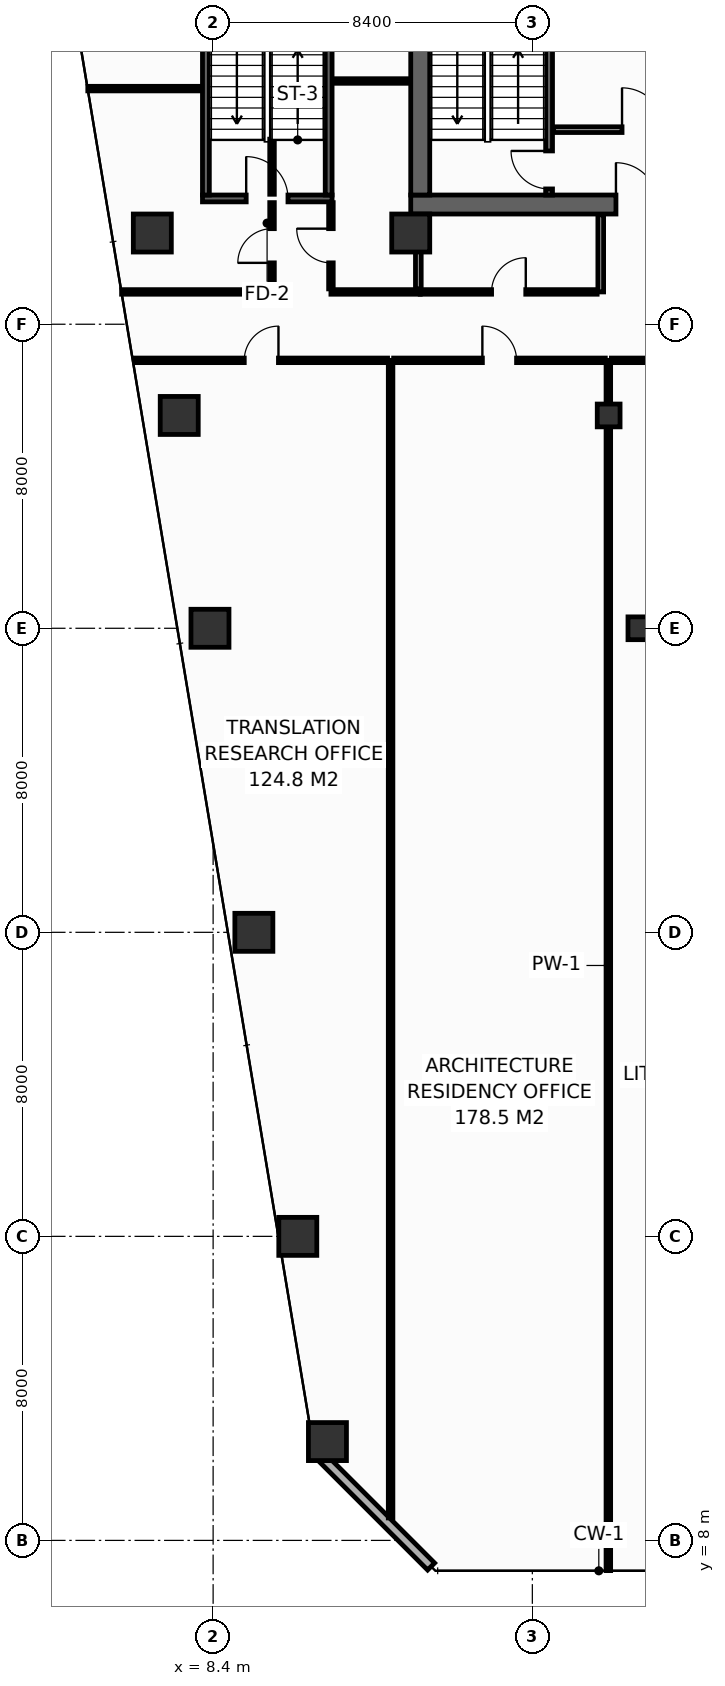
"""IFC4 building model, lengths in metres.
Left out: names, types, materials, properties, quantities, classifications, styles, units other than length and angle.
Written with IfcOpenShell. Run it as: python <this file> out.ifc"""

import sys

from ifc_helpers import new_model, si_unit, direction, frame, frame_2d, origin, origin_2d, place, context, subcontext, project, spatial, rectangle, hollow_rectangle, extrude, element, fill, save


model = new_model("IFC4")
c1 = context("Model", 3, precision=1e-05, world=origin(), true_north=direction((0.0, 1.0)))
c2 = subcontext(c1, "Body", "Model", "MODEL_VIEW")
j1 = project(units=[si_unit("LENGTHUNIT", "METRE"), si_unit("PLANEANGLEUNIT", "RADIAN")], contexts=[c1])
p1 = place(None, origin())
s1 = spatial("IfcSite", under=j1, at=p1, CompositionType="ELEMENT")
p2 = place(p1, origin())
s2 = spatial("IfcBuilding", under=s1, at=p2, CompositionType="ELEMENT")
p3 = place(p2, frame((0.0, 0.0, 160.0)))
s3 = spatial("IfcBuildingStorey", under=s2, at=p3, CompositionType="ELEMENT", Elevation=160.0)
p4 = place(p3, frame((13.6, 43.15, 0.0), z_axis=(0.0, 0.0, 1.0), x_axis=(1.0, 0.0, 0.0)))
e1 = element("IfcWall", 1, at=p4, inside=s3, PredefinedType="SHEAR", context=c2, shape_type="SweptSolid", body=[
    extrude(rectangle(XDim=32.7, YDim=0.5, at=frame_2d((16.35, 0.0))), origin(), (0.0, 0.0, 1.0), 3.55),
])
p5 = place(p4, frame((5.4, 0.0, 0.0)))
e2 = element("IfcOpeningElement", 2, at=p5, cuts=e1, PredefinedType="OPENING", context=c2, shape_type="SweptSolid", body=[
    extrude(rectangle(XDim=1.1, YDim=2.15, at=frame_2d((0.55, 1.075))), frame((0.0, 0.26, 0.0), z_axis=(0.0, -1.0, 0.0), x_axis=(1.0, 0.0, 0.0)), (0.0, 0.0, 1.0), 0.52),
])
p6 = place(p4, frame((25.6, 0.0, 0.0)))
e3 = element("IfcOpeningElement", 3, at=p6, cuts=e1, PredefinedType="OPENING", context=c2, shape_type="SweptSolid", body=[
    extrude(rectangle(XDim=1.1, YDim=2.15, at=frame_2d((0.55, 1.075))), frame((0.0, 0.26, 0.0), z_axis=(0.0, -1.0, 0.0), x_axis=(1.0, 0.0, 0.0)), (0.0, 0.0, 1.0), 0.52),
])
p7 = place(p3, frame((13.85, 43.4, 0.0), z_axis=(0.0, 0.0, 1.0), x_axis=(0.0, 1.0, 0.0)))
e4 = element("IfcWall", 4, at=p7, inside=s3, PredefinedType="SHEAR", context=c2, shape_type="SweptSolid", body=[
    extrude(rectangle(XDim=10.4, YDim=0.5, at=frame_2d((5.2, 0.0))), origin(), (0.0, 0.0, 1.0), 3.55),
])
for number, where, z_axis, x_axis in (
    (5, (6.8, 42.4, 0.0), (0.0, 0.0, 1.0), (1.0, 0.0, 0.0)),
    (6, (13.6, 42.4, 0.0), (0.0, 0.0, 1.0), (1.0, 0.0, 0.0)),
    (7, (11.408, 10.6, 0.0), (0.0, 0.0, 1.0), (1.0, 0.0, 0.0)),
    (8, (10.628, 16.0, 0.0), (0.0, 0.0, 1.0), (1.0, 0.0, 0.0)),
    (9, (9.472, 24.0, 0.0), (0.0, 0.0, 1.0), (1.0, 0.0, 0.0)),
    (10, (8.317, 32.0, 0.0), (0.0, 0.0, 1.0), (1.0, 0.0, 0.0)),
):
    element("IfcColumn", number, at=place(p3, frame(where, z_axis=z_axis, x_axis=x_axis)), inside=s3, PredefinedType="COLUMN", context=c2, shape_type="SweptSolid", body=[
        extrude(hollow_rectangle(XDim=1.0, YDim=1.0, WallThickness=0.045, at=origin_2d()), origin(), (0.0, 0.0, 1.0), 3.8),
    ])
p8 = place(p3, frame((19.617, 32.0, 0.0), z_axis=(0.0, 0.0, 1.0), x_axis=(1.0, 0.0, 0.0)))
e11 = element("IfcColumn", 11, at=p8, inside=s3, PredefinedType="COLUMN", context=c2, shape_type="SweptSolid", body=[
    extrude(hollow_rectangle(XDim=0.6, YDim=0.6, WallThickness=0.028, at=origin_2d()), origin(), (0.0, 0.0, 1.0), 3.8),
])
p9 = place(p3, frame((7.508, 37.6, 0.0), z_axis=(0.0, 0.0, 1.0), x_axis=(1.0, 0.0, 0.0)))
e12 = element("IfcColumn", 12, at=p9, inside=s3, PredefinedType="COLUMN", context=c2, shape_type="SweptSolid", body=[
    extrude(hollow_rectangle(XDim=1.0, YDim=1.0, WallThickness=0.045, at=origin_2d()), origin(), (0.0, 0.0, 1.0), 3.8),
])
p10 = place(p3, frame((18.808, 37.6, 0.0), z_axis=(0.0, 0.0, 1.0), x_axis=(1.0, 0.0, 0.0)))
e13 = element("IfcColumn", 13, at=p10, inside=s3, PredefinedType="COLUMN", context=c2, shape_type="SweptSolid", body=[
    extrude(hollow_rectangle(XDim=0.6, YDim=0.6, WallThickness=0.028, at=origin_2d()), origin(), (0.0, 0.0, 1.0), 3.8),
])
p11 = place(p3, frame((17.24, 43.4, 0.0), z_axis=(0.0, 0.0, 1.0), x_axis=(0.0, 1.0, 0.0)))
e14 = element("IfcWall", 14, at=p11, inside=s3, PredefinedType="SHEAR", context=c2, shape_type="SweptSolid", body=[
    extrude(rectangle(XDim=10.4, YDim=0.18, at=frame_2d((5.2, 0.0))), origin(), (0.0, 0.0, 1.0), 3.55),
])
p12 = place(p11, frame((0.16, 0.0, 0.0)))
e15 = element("IfcOpeningElement", 15, at=p12, cuts=e14, PredefinedType="OPENING", context=c2, shape_type="SweptSolid", body=[
    extrude(rectangle(XDim=1.0, YDim=2.15, at=frame_2d((0.5, 1.075))), frame((0.0, 0.1, 0.0), z_axis=(0.0, -1.0, 0.0), x_axis=(1.0, 0.0, 0.0)), (0.0, 0.0, 1.0), 0.2),
])
p13 = place(p3, frame((8.12, 43.31, 0.0), z_axis=(0.0, 0.0, 1.0), x_axis=(1.0, 0.0, 0.0)))
e16 = element("IfcWall", 16, at=p13, inside=s3, PredefinedType="SHEAR", context=c2, shape_type="SweptSolid", body=[
    extrude(rectangle(XDim=3.41, YDim=0.18, at=frame_2d((1.705, 0.0))), origin(), (0.0, 0.0, 1.0), 3.55),
])
p14 = place(p13, frame((1.15, 0.0, 0.0)))
e17 = element("IfcOpeningElement", 17, at=p14, cuts=e16, PredefinedType="OPENING", context=c2, shape_type="SweptSolid", body=[
    extrude(rectangle(XDim=1.1, YDim=2.15, at=frame_2d((0.55, 1.075))), frame((0.0, 0.1, 0.0), z_axis=(0.0, -1.0, 0.0), x_axis=(1.0, 0.0, 0.0)), (0.0, 0.0, 1.0), 0.2),
])
for number, where, z_axis, x_axis in (
    (18, (11.44, 43.4, 0.0), (0.0, 0.0, 1.0), (0.0, 1.0, 0.0)),
    (19, (8.21, 53.8, 0.0), (0.0, 0.0, 1.0), (0.0, -1.0, 0.0)),
):
    element("IfcWall", number, at=place(p3, frame(where, z_axis=z_axis, x_axis=x_axis)), inside=s3, PredefinedType="SHEAR", context=c2, shape_type="SweptSolid", body=[
        extrude(rectangle(XDim=10.4, YDim=0.18, at=frame_2d((5.2, 0.0))), origin(), (0.0, 0.0, 1.0), 3.55),
    ])
p15 = place(p3, frame((17.36, 45.12, 0.0), z_axis=(0.0, 0.0, 1.0), x_axis=(1.0, 0.0, 0.0)))
e20 = element("IfcWall", 20, at=p15, inside=s3, PredefinedType="PARTITIONING", context=c2, shape_type="SweptSolid", body=[
    extrude(rectangle(XDim=5.14, YDim=0.15, at=frame_2d((2.57, 0.0))), origin(), (0.0, 0.0, 1.0), 3.55),
])
p16 = place(p15, frame((1.8, 0.0, 0.0)))
e21 = element("IfcOpeningElement", 21, at=p16, cuts=e20, PredefinedType="OPENING", context=c2, shape_type="SweptSolid", body=[
    extrude(rectangle(XDim=1.1, YDim=2.15, at=frame_2d((0.55, 1.075))), frame((0.0, 0.085, 0.0), z_axis=(0.0, -1.0, 0.0), x_axis=(1.0, 0.0, 0.0)), (0.0, 0.0, 1.0), 0.17),
])
p17 = place(p3, frame((11.162, 10.287, 0.0), z_axis=(0.0, 0.0, 1.0), x_axis=(0.70707775441, -0.707135806771, 0.0)))
e22 = element("IfcWall", 22, at=p17, inside=s3, PredefinedType="STANDARD", context=c2, shape_type="SweptSolid", body=[
    extrude(rectangle(XDim=4.206, YDim=0.26, at=frame_2d((2.103, 0.0))), origin(), (0.0, 0.0, 1.0), 3.55),
])
p18 = place(p3, frame((5.992, 40.85, 0.0), z_axis=(0.0, 0.0, 1.0), x_axis=(1.0, 0.0, 0.0)))
e23 = element("IfcWall", 23, at=p18, inside=s3, PredefinedType="PARTITIONING", context=c2, shape_type="SweptSolid", body=[
    extrude(rectangle(XDim=3.958, YDim=0.12, at=frame_2d((1.979, 0.0))), origin(), (0.0, 0.0, 1.0), 3.035),
])
p19 = place(p3, frame((11.5, 40.85, 0.0), z_axis=(0.0, 0.0, 1.0), x_axis=(1.0, 0.0, 0.0)))
e24 = element("IfcWall", 24, at=p19, inside=s3, PredefinedType="PARTITIONING", context=c2, shape_type="SweptSolid", body=[
    extrude(rectangle(XDim=2.35, YDim=0.12, at=frame_2d((1.175, 0.0))), origin(), (0.0, 0.0, 1.0), 3.55),
])
p20 = place(p3, frame((5.102, 46.2, 0.0), z_axis=(0.0, 0.0, 1.0), x_axis=(1.0, 0.0, 0.0)))
e25 = element("IfcWall", 25, at=p20, inside=s3, PredefinedType="PARTITIONING", context=c2, shape_type="SweptSolid", body=[
    extrude(rectangle(XDim=2.998, YDim=0.12, at=frame_2d((1.499, 0.0))), origin(), (0.0, 0.0, 1.0), 2.835),
])
p21 = place(p3, frame((9.95, 40.93, 0.0), z_axis=(0.0, 0.0, 1.0), x_axis=(0.0, 1.0, 0.0)))
e26 = element("IfcWall", 26, at=p21, inside=s3, PredefinedType="PARTITIONING", context=c2, shape_type="SweptSolid", body=[
    extrude(rectangle(XDim=2.27, YDim=0.12, at=frame_2d((1.135, 0.0))), origin(), (0.0, 0.0, 1.0), 2.835),
])
p22 = place(p21, frame((0.685, 0.0, 0.0)))
e27 = element("IfcOpeningElement", 27, at=p22, cuts=e26, PredefinedType="OPENING", context=c2, shape_type="SweptSolid", body=[
    extrude(rectangle(XDim=0.9, YDim=2.1, at=frame_2d((0.45, 1.05))), frame((0.0, 0.07, 0.0), z_axis=(0.0, -1.0, 0.0), x_axis=(1.0, 0.0, 0.0)), (0.0, 0.0, 1.0), 0.14),
])
p23 = place(p3, frame((9.95, 43.42, 0.0), z_axis=(0.0, 0.0, 1.0), x_axis=(0.0, 1.0, 0.0)))
e28 = element("IfcWall", 28, at=p23, inside=s3, PredefinedType="PARTITIONING", context=c2, shape_type="SweptSolid", body=[
    extrude(rectangle(XDim=1.45, YDim=0.12, at=frame_2d((0.725, 0.0))), origin(), (0.0, 0.0, 1.0), 3.55),
])
p24 = place(p3, frame((11.55, 46.4, 0.0), z_axis=(0.0, 0.0, 1.0), x_axis=(1.0, 0.0, 0.0)))
e29 = element("IfcWall", 29, at=p24, inside=s3, PredefinedType="PARTITIONING", context=c2, shape_type="SweptSolid", body=[
    extrude(rectangle(XDim=2.03, YDim=0.12, at=frame_2d((1.015, 0.0))), origin(), (0.0, 0.0, 1.0), 3.55),
])
p25 = place(p3, frame((11.5, 40.93, 0.0), z_axis=(0.0, 0.0, 1.0), x_axis=(0.0, 1.0, 0.0)))
e30 = element("IfcWall", 30, at=p25, inside=s3, PredefinedType="PARTITIONING", context=c2, shape_type="SweptSolid", body=[
    extrude(rectangle(XDim=2.27, YDim=0.12, at=frame_2d((1.135, 0.0))), origin(), (0.0, 0.0, 1.0), 2.835),
])
p26 = place(p25, frame((0.685, 0.0, 0.0)))
e31 = element("IfcOpeningElement", 31, at=p26, cuts=e30, PredefinedType="OPENING", context=c2, shape_type="SweptSolid", body=[
    extrude(rectangle(XDim=0.9, YDim=2.1, at=frame_2d((0.45, 1.05))), frame((0.0, 0.07, 0.0), z_axis=(0.0, -1.0, 0.0), x_axis=(1.0, 0.0, 0.0)), (0.0, 0.0, 1.0), 0.14),
])
p27 = place(p3, frame((13.8, 40.93, 0.0), z_axis=(0.0, 0.0, 1.0), x_axis=(0.0, 1.0, 0.0)))
e32 = element("IfcWall", 32, at=p27, inside=s3, PredefinedType="PARTITIONING", context=c2, shape_type="SweptSolid", body=[
    extrude(rectangle(XDim=1.95, YDim=0.15, at=frame_2d((0.975, 0.0))), origin(), (0.0, 0.0, 1.0), 3.55),
])
p28 = place(p3, frame((18.6, 40.85, 0.0), z_axis=(0.0, 0.0, 1.0), x_axis=(0.0, 1.0, 0.0)))
e33 = element("IfcWall", 33, at=p28, inside=s3, PredefinedType="PARTITIONING", context=c2, shape_type="SweptSolid", body=[
    extrude(rectangle(XDim=2.03, YDim=0.15, at=frame_2d((1.015, 0.0))), origin(), (0.0, 0.0, 1.0), 3.55),
])
p29 = place(p3, frame((13.85, 40.85, 0.0), z_axis=(0.0, 0.0, 1.0), x_axis=(1.0, 0.0, 0.0)))
e34 = element("IfcWall", 34, at=p29, inside=s3, PredefinedType="PARTITIONING", context=c2, shape_type="SweptSolid", body=[
    extrude(rectangle(XDim=4.655, YDim=0.12, at=frame_2d((2.327, 0.0))), origin(), (0.0, 0.0, 1.0), 3.55),
])
p30 = place(p29, frame((1.877, 0.0, 0.0)))
e35 = element("IfcOpeningElement", 35, at=p30, cuts=e34, PredefinedType="OPENING", context=c2, shape_type="SweptSolid", body=[
    extrude(rectangle(XDim=0.9, YDim=2.1, at=frame_2d((0.45, 1.05))), frame((0.0, 0.07, 0.0), z_axis=(0.0, -1.0, 0.0), x_axis=(1.0, 0.0, 0.0)), (0.0, 0.0, 1.0), 0.14),
])
p31 = place(p3, frame((13.07, 8.591, 0.0), z_axis=(0.0, 0.0, 1.0), x_axis=(0.0, 1.0, 0.0)))
e36 = element("IfcWall", 36, at=p31, inside=s3, PredefinedType="PARTITIONING", context=c2, shape_type="SweptSolid", body=[
    extrude(rectangle(XDim=30.459, YDim=0.12, at=frame_2d((15.229, 0.0))), origin(), (0.0, 0.0, 1.0), 2.835),
])
p32 = place(p3, frame((18.8, 7.205, 0.0), z_axis=(0.0, 0.0, 1.0), x_axis=(0.0, 1.0, 0.0)))
e37 = element("IfcWall", 37, at=p32, inside=s3, PredefinedType="PARTITIONING", context=c2, shape_type="SweptSolid", body=[
    extrude(rectangle(XDim=31.845, YDim=0.12, at=frame_2d((15.922, 0.0))), origin(), (0.0, 0.0, 1.0), 2.835),
])
p33 = place(p3, frame((6.348, 39.05, 0.0), z_axis=(0.0, 0.0, 1.0), x_axis=(1.0, 0.0, 0.0)))
e38 = element("IfcWall", 38, at=p33, inside=s3, PredefinedType="PARTITIONING", context=c2, shape_type="SweptSolid", body=[
    extrude(rectangle(XDim=6.642, YDim=0.12, at=frame_2d((3.321, 0.0))), origin(), (0.0, 0.0, 1.0), 3.035),
])
p34 = place(p33, frame((2.871, 0.0, 0.0)))
e39 = element("IfcOpeningElement", 39, at=p34, cuts=e38, PredefinedType="OPENING", context=c2, shape_type="SweptSolid", body=[
    extrude(rectangle(XDim=0.9, YDim=2.1, at=frame_2d((0.45, 1.05))), frame((0.0, 0.07, 0.0), z_axis=(0.0, -1.0, 0.0), x_axis=(1.0, 0.0, 0.0)), (0.0, 0.0, 1.0), 0.14),
])
p35 = place(p3, frame((13.15, 39.05, 0.0), z_axis=(0.0, 0.0, 1.0), x_axis=(1.0, 0.0, 0.0)))
e40 = element("IfcWall", 40, at=p35, inside=s3, PredefinedType="PARTITIONING", context=c2, shape_type="SweptSolid", body=[
    extrude(rectangle(XDim=5.57, YDim=0.12, at=frame_2d((2.785, 0.0))), origin(), (0.0, 0.0, 1.0), 3.55),
])
p36 = place(p35, frame((2.335, 0.0, 0.0)))
e41 = element("IfcOpeningElement", 41, at=p36, cuts=e40, PredefinedType="OPENING", context=c2, shape_type="SweptSolid", body=[
    extrude(rectangle(XDim=0.9, YDim=2.1, at=frame_2d((0.45, 1.05))), frame((0.0, 0.07, 0.0), z_axis=(0.0, -1.0, 0.0), x_axis=(1.0, 0.0, 0.0)), (0.0, 0.0, 1.0), 0.14),
])
p37 = place(p3, frame((18.88, 39.05, 0.0), z_axis=(0.0, 0.0, 1.0), x_axis=(1.0, 0.0, 0.0)))
e42 = element("IfcWall", 42, at=p37, inside=s3, PredefinedType="PARTITIONING", context=c2, shape_type="SweptSolid", body=[
    extrude(rectangle(XDim=4.97, YDim=0.12, at=frame_2d((2.485, 0.0))), origin(), (0.0, 0.0, 1.0), 2.835),
])
p38 = place(p37, frame((2.035, 0.0, 0.0)))
e43 = element("IfcOpeningElement", 43, at=p38, cuts=e42, PredefinedType="OPENING", context=c2, shape_type="SweptSolid", body=[
    extrude(rectangle(XDim=0.9, YDim=2.1, at=frame_2d((0.45, 1.05))), frame((0.0, 0.07, 0.0), z_axis=(0.0, -1.0, 0.0), x_axis=(1.0, 0.0, 0.0)), (0.0, 0.0, 1.0), 0.14),
])
p39 = place(p12, origin())
e44 = element("IfcDoor", 44, at=p39, inside=s3, OperationType="SINGLE_SWING_RIGHT", PredefinedType="DOOR", context=c2, shape_type="SweptSolid", body=[
    extrude(rectangle(XDim=1.0, YDim=2.15, at=frame_2d((0.5, 1.075))), frame((0.0, 0.025, 0.0), z_axis=(0.0, -1.0, 0.0), x_axis=(1.0, 0.0, 0.0)), (0.0, 0.0, 1.0), 0.05),
])
fill(e15, e44)
p40 = place(p14, origin())
e45 = element("IfcDoor", 45, at=p40, inside=s3, OperationType="SINGLE_SWING_LEFT", PredefinedType="DOOR", context=c2, shape_type="SweptSolid", body=[
    extrude(rectangle(XDim=1.1, YDim=2.15, at=frame_2d((0.55, 1.075))), frame((0.0, 0.025, 0.0), z_axis=(0.0, -1.0, 0.0), x_axis=(1.0, 0.0, 0.0)), (0.0, 0.0, 1.0), 0.05),
])
fill(e17, e45)
p41 = place(p16, origin())
e46 = element("IfcDoor", 46, at=p41, inside=s3, OperationType="SINGLE_SWING_LEFT", PredefinedType="DOOR", context=c2, shape_type="SweptSolid", body=[
    extrude(rectangle(XDim=1.1, YDim=2.15, at=frame_2d((0.55, 1.075))), frame((0.0, 0.025, 0.0), z_axis=(0.0, -1.0, 0.0), x_axis=(1.0, 0.0, 0.0)), (0.0, 0.0, 1.0), 0.05),
])
fill(e21, e46)
p42 = place(p5, origin())
e47 = element("IfcDoor", 47, at=p42, inside=s3, OperationType="SINGLE_SWING_LEFT", PredefinedType="DOOR", context=c2, shape_type="SweptSolid", body=[
    extrude(rectangle(XDim=1.1, YDim=2.15, at=frame_2d((0.55, 1.075))), frame((0.0, 0.025, 0.0), z_axis=(0.0, -1.0, 0.0), x_axis=(1.0, 0.0, 0.0)), (0.0, 0.0, 1.0), 0.05),
])
fill(e2, e47)
p43 = place(p22, origin())
e48 = element("IfcDoor", 48, at=p43, inside=s3, OperationType="SINGLE_SWING_LEFT", PredefinedType="DOOR", context=c2, shape_type="SweptSolid", body=[
    extrude(rectangle(XDim=0.9, YDim=2.1, at=frame_2d((0.45, 1.05))), frame((0.0, 0.025, 0.0), z_axis=(0.0, -1.0, 0.0), x_axis=(1.0, 0.0, 0.0)), (0.0, 0.0, 1.0), 0.05),
])
fill(e27, e48)
p44 = place(p26, origin())
e49 = element("IfcDoor", 49, at=p44, inside=s3, OperationType="SINGLE_SWING_RIGHT", PredefinedType="DOOR", context=c2, shape_type="SweptSolid", body=[
    extrude(rectangle(XDim=0.9, YDim=2.1, at=frame_2d((0.45, 1.05))), frame((0.0, 0.025, 0.0), z_axis=(0.0, -1.0, 0.0), x_axis=(1.0, 0.0, 0.0)), (0.0, 0.0, 1.0), 0.05),
])
fill(e31, e49)
p45 = place(p30, origin())
e50 = element("IfcDoor", 50, at=p45, inside=s3, OperationType="SINGLE_SWING_RIGHT", PredefinedType="DOOR", context=c2, shape_type="SweptSolid", body=[
    extrude(rectangle(XDim=0.9, YDim=2.1, at=frame_2d((0.45, 1.05))), frame((0.0, 0.025, 0.0), z_axis=(0.0, -1.0, 0.0), x_axis=(1.0, 0.0, 0.0)), (0.0, 0.0, 1.0), 0.05),
])
fill(e35, e50)
p46 = place(p34, origin())
e51 = element("IfcDoor", 51, at=p46, inside=s3, OperationType="SINGLE_SWING_RIGHT", PredefinedType="DOOR", context=c2, shape_type="SweptSolid", body=[
    extrude(rectangle(XDim=0.9, YDim=2.1, at=frame_2d((0.45, 1.05))), frame((0.0, 0.025, 0.0), z_axis=(0.0, -1.0, 0.0), x_axis=(1.0, 0.0, 0.0)), (0.0, 0.0, 1.0), 0.05),
])
fill(e39, e51)
p47 = place(p36, origin())
e52 = element("IfcDoor", 52, at=p47, inside=s3, OperationType="SINGLE_SWING_LEFT", PredefinedType="DOOR", context=c2, shape_type="SweptSolid", body=[
    extrude(rectangle(XDim=0.9, YDim=2.1, at=frame_2d((0.45, 1.05))), frame((0.0, 0.025, 0.0), z_axis=(0.0, -1.0, 0.0), x_axis=(1.0, 0.0, 0.0)), (0.0, 0.0, 1.0), 0.05),
])
fill(e41, e52)
save(model, sys.argv[1])
